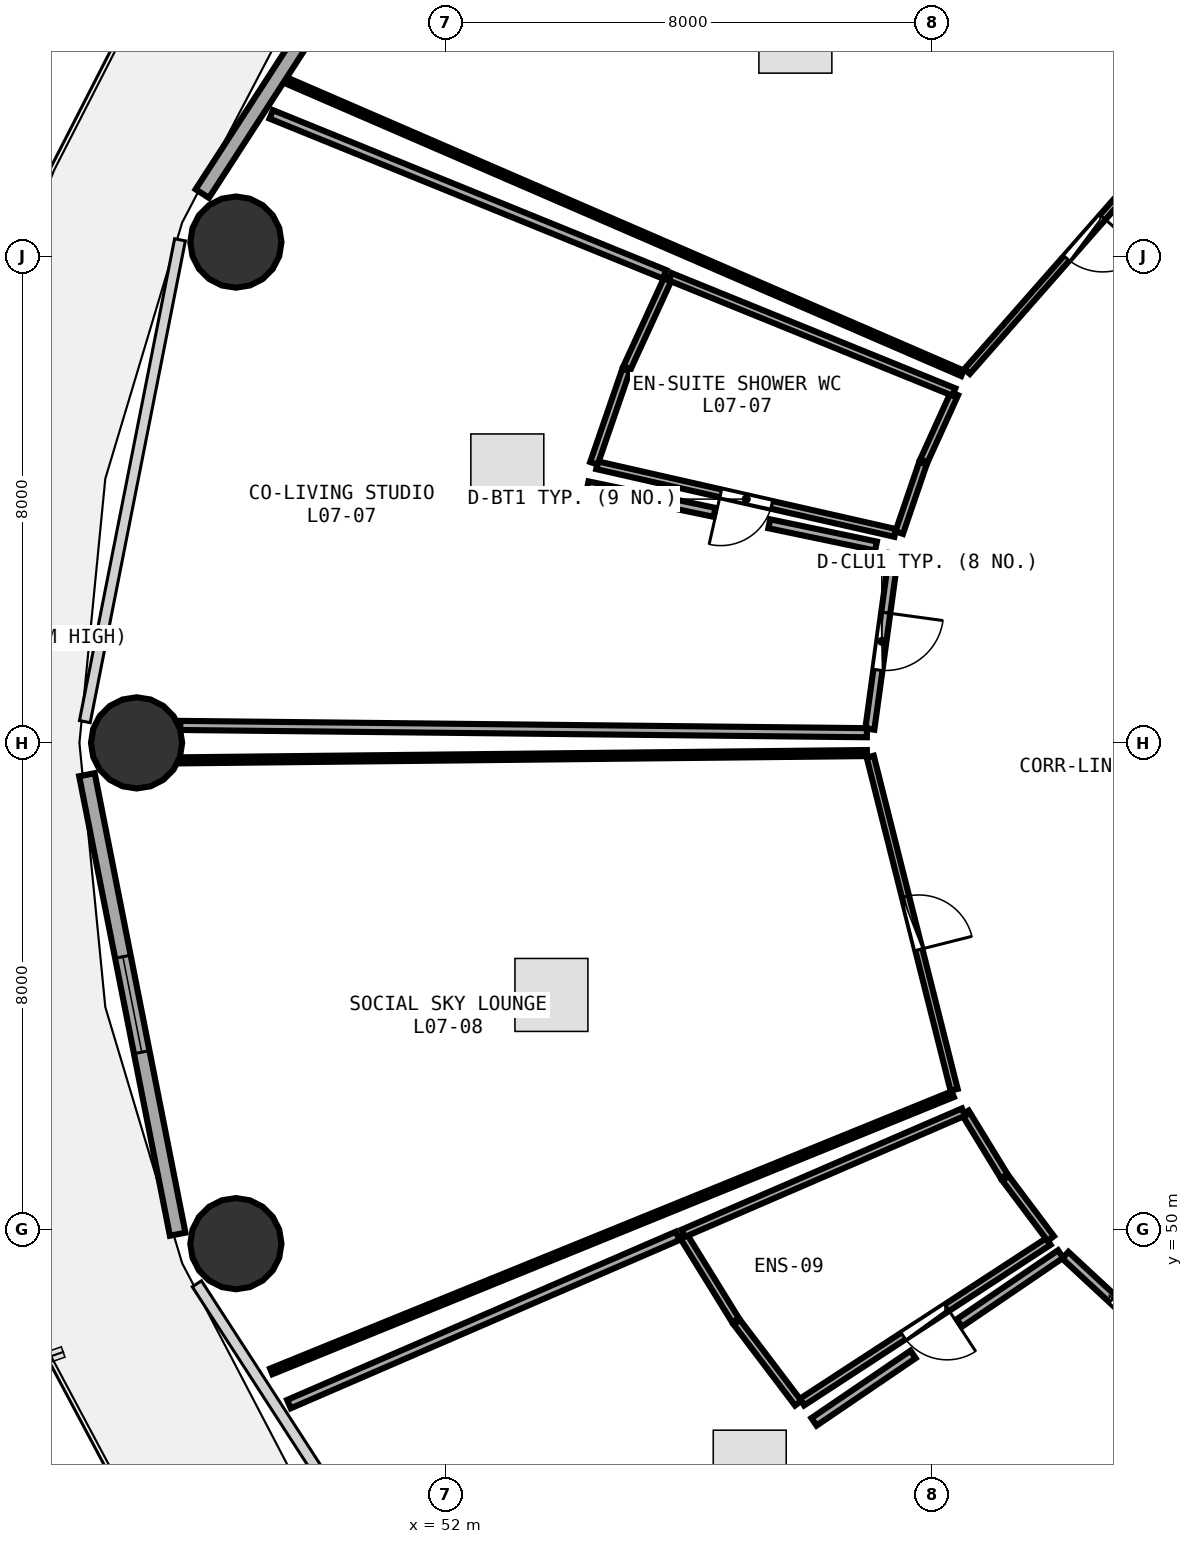
"""IFC4 building model, lengths in metres.
Left out: names, types, materials, properties, quantities, classifications, styles, units other than length and angle.
Written with IfcOpenShell. Run it as: python <this file> out.ifc"""

import sys

from ifc_helpers import new_model, si_unit, direction, frame, frame_2d, origin, origin_2d, place, context, subcontext, project, spatial, rectangle, circle, extrude, element, fill, save


model = new_model("IFC4")
c1 = context("Model", 3, precision=1e-05, world=origin(), true_north=direction((0.0, 1.0)))
c2 = subcontext(c1, "Body", "Model", "MODEL_VIEW")
j1 = project(units=[si_unit("LENGTHUNIT", "METRE"), si_unit("PLANEANGLEUNIT", "RADIAN")], contexts=[c1])
p1 = place(None, origin())
s1 = spatial("IfcSite", under=j1, at=p1, CompositionType="ELEMENT")
p2 = place(p1, origin())
s2 = spatial("IfcBuilding", under=s1, at=p2, CompositionType="ELEMENT")
p3 = place(p2, frame((0.0, 0.0, 30.0)))
s3 = spatial("IfcBuildingStorey", under=s2, at=p3, CompositionType="ELEMENT", Elevation=30.0)
for number, where, z_axis, x_axis in (
    (1, (48.553, 66.236, 0.0), (0.0, 0.0, 1.0), (1.0, 0.0, 0.0)),
    (2, (46.92, 58.0, 0.0), (0.0, 0.0, 1.0), (1.0, 0.0, 0.0)),
    (3, (48.553, 49.764, 0.0), (0.0, 0.0, 1.0), (1.0, 0.0, 0.0)),
):
    element("IfcColumn", number, at=place(p3, frame(where, z_axis=z_axis, x_axis=x_axis)), inside=s3, PredefinedType="COLUMN", context=c2, shape_type="SweptSolid", body=[
        extrude(circle(Radius=0.75, at=origin_2d()), origin(), (0.0, 0.0, 1.0), 3.75),
    ])
p4 = place(p3, frame((52.311, 73.698, 0.0), z_axis=(0.0, 0.0, 1.0), x_axis=(-0.543005114258, -0.839729388488, 0.0)))
e4 = element("IfcWall", 4, at=p4, inside=s3, PredefinedType="SOLIDWALL", context=c2, shape_type="SweptSolid", body=[
    extrude(rectangle(XDim=7.938, YDim=0.26, at=frame_2d((3.969, 0.0))), origin(), (0.0, 0.0, 1.0), 3.475),
])
p5 = place(p4, frame((3.494, 0.0, 0.0)))
e5 = element("IfcOpeningElement", 5, at=p5, cuts=e4, PredefinedType="OPENING", context=c2, shape_type="SweptSolid", body=[
    extrude(rectangle(XDim=0.95, YDim=2.1, at=frame_2d((0.475, 1.05))), frame((0.0, 0.14, 0.0), z_axis=(0.0, -1.0, 0.0), x_axis=(1.0, 0.0, 0.0)), (0.0, 0.0, 1.0), 0.28),
])
p6 = place(p4, frame((1.914, 0.0, 0.85)))
e6 = element("IfcOpeningElement", 6, at=p6, cuts=e4, PredefinedType="OPENING", context=c2, shape_type="SweptSolid", body=[
    extrude(rectangle(XDim=1.2, YDim=1.45, at=frame_2d((0.6, 0.725))), frame((0.0, 0.14, 0.0), z_axis=(0.0, -1.0, 0.0), x_axis=(1.0, 0.0, 0.0)), (0.0, 0.0, 1.0), 0.28),
])
p7 = place(p3, frame((46.104, 57.477, 0.0), z_axis=(0.0, 0.0, 1.0), x_axis=(0.193726159581, -0.98105564322, 0.0)))
e7 = element("IfcWall", 7, at=p7, inside=s3, PredefinedType="SOLIDWALL", context=c2, shape_type="SweptSolid", body=[
    extrude(rectangle(XDim=7.703, YDim=0.26, at=frame_2d((3.851, 0.0))), origin(), (0.0, 0.0, 1.0), 3.475),
])
p8 = place(p7, frame((3.051, 0.0, 0.85)))
e8 = element("IfcOpeningElement", 8, at=p8, cuts=e7, PredefinedType="OPENING", context=c2, shape_type="SweptSolid", body=[
    extrude(rectangle(XDim=1.6, YDim=1.45, at=frame_2d((0.8, 0.725))), frame((0.0, 0.14, 0.0), z_axis=(0.0, -1.0, 0.0), x_axis=(1.0, 0.0, 0.0)), (0.0, 0.0, 1.0), 0.28),
])
p9 = place(p3, frame((64.446, 68.507, 0.0), z_axis=(0.0, 0.0, 1.0), x_axis=(-0.660323401664, -0.75098136143, 0.0)))
e9 = element("IfcWall", 9, at=p9, inside=s3, PredefinedType="PARTITIONING", context=c2, shape_type="SweptSolid", body=[
    extrude(rectangle(XDim=5.857, YDim=0.12, at=frame_2d((2.929, 0.0))), origin(), (0.0, 0.0, 1.0), 2.875),
])
p10 = place(p9, frame((2.479, 0.0, 0.0)))
e10 = element("IfcOpeningElement", 10, at=p10, cuts=e9, PredefinedType="OPENING", context=c2, shape_type="SweptSolid", body=[
    extrude(rectangle(XDim=0.9, YDim=2.08, at=frame_2d((0.45, 1.04))), frame((0.0, 0.07, 0.0), z_axis=(0.0, -1.0, 0.0), x_axis=(1.0, 0.0, 0.0)), (0.0, 0.0, 1.0), 0.14),
])
p11 = place(p3, frame((59.397, 61.452, 0.0), z_axis=(0.0, 0.0, 1.0), x_axis=(-0.975187669184, 0.221379786503, 0.0)))
e11 = element("IfcWall", 11, at=p11, inside=s3, PredefinedType="PLUMBINGWALL", context=c2, shape_type="SweptSolid", body=[
    extrude(rectangle(XDim=5.029, YDim=0.13, at=frame_2d((2.514, 0.0))), origin(), (0.0, 0.0, 1.0), 3.175),
])
p12 = place(p11, frame((2.084, 0.0, 0.0)))
e12 = element("IfcOpeningElement", 12, at=p12, cuts=e11, PredefinedType="OPENING", context=c2, shape_type="SweptSolid", body=[
    extrude(rectangle(XDim=0.86, YDim=2.05, at=frame_2d((0.43, 1.025))), frame((0.0, 0.075, 0.0), z_axis=(0.0, -1.0, 0.0), x_axis=(1.0, 0.0, 0.0)), (0.0, 0.0, 1.0), 0.15),
])
p13 = place(p3, frame((59.375, 61.115, 0.0), z_axis=(0.0, 0.0, 1.0), x_axis=(-0.135838186105, -0.990731036758, 0.0)))
e13 = element("IfcWall", 13, at=p13, inside=s3, PredefinedType="PARTITIONING", context=c2, shape_type="SweptSolid", body=[
    extrude(rectangle(XDim=2.915, YDim=0.15, at=frame_2d((1.458, 0.0))), origin(), (0.0, 0.0, 1.0), 3.48),
])
p14 = place(p13, frame((0.983, 0.0, 0.0)))
e14 = element("IfcOpeningElement", 14, at=p14, cuts=e13, PredefinedType="OPENING", context=c2, shape_type="SweptSolid", body=[
    extrude(rectangle(XDim=0.95, YDim=2.08, at=frame_2d((0.475, 1.04))), frame((0.0, 0.085, 0.0), z_axis=(0.0, -1.0, 0.0), x_axis=(1.0, 0.0, 0.0)), (0.0, 0.0, 1.0), 0.17),
])
p15 = place(p3, frame((58.986, 57.775, 0.0), z_axis=(0.0, 0.0, 1.0), x_axis=(0.244192294026, -0.969726829338, 0.0)))
e15 = element("IfcWall", 15, at=p15, inside=s3, PredefinedType="PARTITIONING", context=c2, shape_type="SweptSolid", body=[
    extrude(rectangle(XDim=5.651, YDim=0.12, at=frame_2d((2.825, 0.0))), origin(), (0.0, 0.0, 1.0), 3.48),
])
p16 = place(p15, frame((2.375, 0.0, 0.0)))
e16 = element("IfcOpeningElement", 16, at=p16, cuts=e15, PredefinedType="OPENING", context=c2, shape_type="SweptSolid", body=[
    extrude(rectangle(XDim=0.9, YDim=2.08, at=frame_2d((0.45, 1.04))), frame((0.0, 0.07, 0.0), z_axis=(0.0, -1.0, 0.0), x_axis=(1.0, 0.0, 0.0)), (0.0, 0.0, 1.0), 0.14),
])
p17 = place(p3, frame((61.917, 49.8, 0.0), z_axis=(0.0, 0.0, 1.0), x_axis=(-0.837796261941, -0.545982988267, 0.0)))
e17 = element("IfcWall", 17, at=p17, inside=s3, PredefinedType="PLUMBINGWALL", context=c2, shape_type="SweptSolid", body=[
    extrude(rectangle(XDim=4.838, YDim=0.13, at=frame_2d((2.419, 0.0))), origin(), (0.0, 0.0, 1.0), 3.235),
])
p18 = place(p17, frame((1.989, 0.0, 0.0)))
e18 = element("IfcOpeningElement", 18, at=p18, cuts=e17, PredefinedType="OPENING", context=c2, shape_type="SweptSolid", body=[
    extrude(rectangle(XDim=0.86, YDim=2.05, at=frame_2d((0.43, 1.025))), frame((0.0, 0.075, 0.0), z_axis=(0.0, -1.0, 0.0), x_axis=(1.0, 0.0, 0.0)), (0.0, 0.0, 1.0), 0.15),
])
p19 = place(p3, frame((62.194, 49.575, 0.0), z_axis=(0.0, 0.0, 1.0), x_axis=(0.7329267348, -0.680307578538, 0.0)))
e19 = element("IfcWall", 19, at=p19, inside=s3, PredefinedType="PARTITIONING", context=c2, shape_type="SweptSolid", body=[
    extrude(rectangle(XDim=3.067, YDim=0.15, at=frame_2d((1.533, 0.0))), origin(), (0.0, 0.0, 1.0), 2.875),
])
p20 = place(p19, frame((1.059, 0.0, 0.0)))
e20 = element("IfcOpeningElement", 20, at=p20, cuts=e19, PredefinedType="OPENING", context=c2, shape_type="SweptSolid", body=[
    extrude(rectangle(XDim=0.95, YDim=2.08, at=frame_2d((0.475, 1.04))), frame((0.0, 0.085, 0.0), z_axis=(0.0, -1.0, 0.0), x_axis=(1.0, 0.0, 0.0)), (0.0, 0.0, 1.0), 0.17),
])
p21 = place(p3, frame((64.746, 68.789, 0.0), z_axis=(0.0, 0.0, 1.0), x_axis=(-0.66580890104, 0.746122313897, 0.0)))
e21 = element("IfcWall", 21, at=p21, inside=s3, PredefinedType="PARTITIONING", context=c2, shape_type="SweptSolid", body=[
    extrude(rectangle(XDim=11.399, YDim=0.15, at=frame_2d((5.7, 0.0))), origin(), (0.0, 0.0, 1.0), 2.875),
])
p22 = place(p3, frame((60.502, 64.079, 0.0), z_axis=(0.0, 0.0, 1.0), x_axis=(-0.917695041134, 0.397285554077, 0.0)))
e22 = element("IfcWall", 22, at=p22, inside=s3, PredefinedType="PARTITIONING", context=c2, shape_type="SweptSolid", body=[
    extrude(rectangle(XDim=12.07, YDim=0.1, at=frame_2d((6.035, 0.0))), origin(), (0.0, 0.0, 1.0), 2.875),
])
p23 = place(p3, frame((56.632, 76.922, 0.0), z_axis=(0.0, 0.0, 1.0), x_axis=(0.684261294523, -0.729236916796, 0.0)))
e23 = element("IfcWall", 23, at=p23, inside=s3, PredefinedType="PARTITIONING", context=c2, shape_type="SweptSolid", body=[
    extrude(rectangle(XDim=11.438, YDim=0.1, at=frame_2d((5.719, 0.0))), origin(), (0.0, 0.0, 1.0), 2.875),
])
p24 = place(p3, frame((60.372, 63.745, 0.0), z_axis=(0.0, 0.0, 1.0), x_axis=(-0.4138937247, -0.910325208183, 0.0)))
e24 = element("IfcWall", 24, at=p24, inside=s3, PredefinedType="PLUMBINGWALL", context=c2, shape_type="SweptSolid", body=[
    extrude(rectangle(XDim=1.216, YDim=0.13, at=frame_2d((0.608, 0.0))), origin(), (0.0, 0.0, 1.0), 3.48),
])
p25 = place(p3, frame((59.854, 62.601, 0.0), z_axis=(0.0, 0.0, 1.0), x_axis=(-0.323735286305, -0.946147696928, 0.0)))
e25 = element("IfcWall", 25, at=p25, inside=s3, PredefinedType="PLUMBINGWALL", context=c2, shape_type="SweptSolid", body=[
    extrude(rectangle(XDim=1.208, YDim=0.13, at=frame_2d((0.604, 0.0))), origin(), (0.0, 0.0, 1.0), 3.48),
])
p26 = place(p3, frame((54.441, 62.598, 0.0), z_axis=(0.0, 0.0, 1.0), x_axis=(0.326356647952, 0.945246707657, 0.0)))
e26 = element("IfcWall", 26, at=p26, inside=s3, PredefinedType="PLUMBINGWALL", context=c2, shape_type="SweptSolid", body=[
    extrude(rectangle(XDim=1.624, YDim=0.13, at=frame_2d((0.812, 0.0))), origin(), (0.0, 0.0, 1.0), 3.48),
])
p27 = place(p3, frame((54.986, 64.17, 0.0), z_axis=(0.0, 0.0, 1.0), x_axis=(0.41762687648, 0.908618617486, 0.0)))
e27 = element("IfcWall", 27, at=p27, inside=s3, PredefinedType="PLUMBINGWALL", context=c2, shape_type="SweptSolid", body=[
    extrude(rectangle(XDim=1.634, YDim=0.13, at=frame_2d((0.817, 0.0))), origin(), (0.0, 0.0, 1.0), 2.875),
])
p28 = place(p3, frame((55.696, 65.666, 0.0), z_axis=(0.0, 0.0, 1.0), x_axis=(0.926504606816, -0.376283421835, 0.0)))
e28 = element("IfcWall", 28, at=p28, inside=s3, PredefinedType="PLUMBINGWALL", context=c2, shape_type="SweptSolid", body=[
    extrude(rectangle(XDim=5.036, YDim=0.13, at=frame_2d((2.518, 0.0))), origin(), (0.0, 0.0, 1.0), 2.875),
])
p29 = place(p3, frame((58.931, 58.167, 0.0), z_axis=(0.0, 0.0, 1.0), x_axis=(-0.999943877154, 0.010594458135, 0.0)))
e29 = element("IfcWall", 29, at=p29, inside=s3, PredefinedType="PARTITIONING", context=c2, shape_type="SweptSolid", body=[
    extrude(rectangle(XDim=11.292, YDim=0.15, at=frame_2d((5.646, 0.0))), origin(), (0.0, 0.0, 1.0), 2.875),
])
p30 = place(p3, frame((49.135, 68.336, 0.0), z_axis=(0.0, 0.0, 1.0), x_axis=(0.926325178802, -0.376724917038, 0.0)))
e30 = element("IfcWall", 30, at=p30, inside=s3, PredefinedType="PARTITIONING", context=c2, shape_type="SweptSolid", body=[
    extrude(rectangle(XDim=6.983, YDim=0.15, at=frame_2d((3.492, 0.0))), origin(), (0.0, 0.0, 1.0), 2.875),
])
p31 = place(p3, frame((54.337, 62.227, 0.0), z_axis=(0.0, 0.0, 1.0), x_axis=(0.978922282622, -0.204233113343, 0.0)))
e31 = element("IfcWall", 31, at=p31, inside=s3, PredefinedType="PARTITIONING", context=c2, shape_type="SweptSolid", body=[
    extrude(rectangle(XDim=2.133, YDim=0.15, at=frame_2d((1.066, 0.0))), origin(), (0.0, 0.0, 1.0), 3.175),
])
p32 = place(p3, frame((57.325, 61.603, 0.0), z_axis=(0.0, 0.0, 1.0), x_axis=(0.978929424395, -0.204198878681, 0.0)))
e32 = element("IfcWall", 32, at=p32, inside=s3, PredefinedType="PARTITIONING", context=c2, shape_type="SweptSolid", body=[
    extrude(rectangle(XDim=1.793, YDim=0.15, at=frame_2d((0.897, 0.0))), origin(), (0.0, 0.0, 1.0), 3.235),
])
p33 = place(p3, frame((60.343, 52.222, 0.0), z_axis=(0.0, 0.0, 1.0), x_axis=(-0.926333713065, -0.376703931542, 0.0)))
e33 = element("IfcWall", 33, at=p33, inside=s3, PredefinedType="PARTITIONING", context=c2, shape_type="SweptSolid", body=[
    extrude(rectangle(XDim=12.099, YDim=0.1, at=frame_2d((6.05, 0.0))), origin(), (0.0, 0.0, 1.0), 2.875),
])
p34 = place(p3, frame((47.64, 57.713, 0.0), z_axis=(0.0, 0.0, 1.0), x_axis=(0.999943877154, 0.010594458135, 0.0)))
e34 = element("IfcWall", 34, at=p34, inside=s3, PredefinedType="PARTITIONING", context=c2, shape_type="SweptSolid", body=[
    extrude(rectangle(XDim=11.292, YDim=0.1, at=frame_2d((5.646, 0.0))), origin(), (0.0, 0.0, 1.0), 2.875),
])
p35 = place(p3, frame((60.549, 51.92, 0.0), z_axis=(0.0, 0.0, 1.0), x_axis=(0.52146609248, -0.853272004928, 0.0)))
e35 = element("IfcWall", 35, at=p35, inside=s3, PredefinedType="PLUMBINGWALL", context=c2, shape_type="SweptSolid", body=[
    extrude(rectangle(XDim=1.228, YDim=0.13, at=frame_2d((0.614, 0.0))), origin(), (0.0, 0.0, 1.0), 3.48),
])
p36 = place(p3, frame((61.212, 50.839, 0.0), z_axis=(0.0, 0.0, 1.0), x_axis=(0.600347056143, -0.79973959023, 0.0)))
e36 = element("IfcWall", 36, at=p36, inside=s3, PredefinedType="PLUMBINGWALL", context=c2, shape_type="SweptSolid", body=[
    extrude(rectangle(XDim=1.238, YDim=0.13, at=frame_2d((0.619, 0.0))), origin(), (0.0, 0.0, 1.0), 2.875),
])
p37 = place(p3, frame((57.801, 47.142, 0.0), z_axis=(0.0, 0.0, 1.0), x_axis=(-0.60376191721, 0.797164692725, 0.0)))
e37 = element("IfcWall", 37, at=p37, inside=s3, PredefinedType="PLUMBINGWALL", context=c2, shape_type="SweptSolid", body=[
    extrude(rectangle(XDim=1.669, YDim=0.13, at=frame_2d((0.834, 0.0))), origin(), (0.0, 0.0, 1.0), 3.175),
])
p38 = place(p3, frame((56.771, 48.505, 0.0), z_axis=(0.0, 0.0, 1.0), x_axis=(-0.525540089642, 0.850768837099, 0.0)))
e38 = element("IfcWall", 38, at=p38, inside=s3, PredefinedType="PLUMBINGWALL", context=c2, shape_type="SweptSolid", body=[
    extrude(rectangle(XDim=1.651, YDim=0.13, at=frame_2d((0.826, 0.0))), origin(), (0.0, 0.0, 1.0), 3.175),
])
p39 = place(p3, frame((55.91, 49.935, 0.0), z_axis=(0.0, 0.0, 1.0), x_axis=(0.917797204715, 0.397049481826, 0.0)))
e39 = element("IfcWall", 39, at=p39, inside=s3, PredefinedType="PLUMBINGWALL", context=c2, shape_type="SweptSolid", body=[
    extrude(rectangle(XDim=5.023, YDim=0.13, at=frame_2d((2.511, 0.0))), origin(), (0.0, 0.0, 1.0), 2.875),
])
p40 = place(p3, frame((64.458, 47.419, 0.0), z_axis=(0.0, 0.0, 1.0), x_axis=(-0.684261294523, -0.729236916796, 0.0)))
e40 = element("IfcWall", 40, at=p40, inside=s3, PredefinedType="PARTITIONING", context=c2, shape_type="SweptSolid", body=[
    extrude(rectangle(XDim=11.438, YDim=0.15, at=frame_2d((5.719, 0.0))), origin(), (0.0, 0.0, 1.0), 2.875),
])
p41 = place(p3, frame((49.426, 47.126, 0.0), z_axis=(0.0, 0.0, 1.0), x_axis=(0.917736225937, 0.397190407239, 0.0)))
e41 = element("IfcWall", 41, at=p41, inside=s3, PredefinedType="PARTITIONING", context=c2, shape_type="SweptSolid", body=[
    extrude(rectangle(XDim=6.967, YDim=0.15, at=frame_2d((3.483, 0.0))), origin(), (0.0, 0.0, 1.0), 2.875),
])
p42 = place(p3, frame((58.061, 46.834, 0.0), z_axis=(0.0, 0.0, 1.0), x_axis=(0.826811291248, 0.562479411769, 0.0)))
e42 = element("IfcWall", 42, at=p42, inside=s3, PredefinedType="PARTITIONING", context=c2, shape_type="SweptSolid", body=[
    extrude(rectangle(XDim=1.971, YDim=0.15, at=frame_2d((0.985, 0.0))), origin(), (0.0, 0.0, 1.0), 3.48),
])
p43 = place(p3, frame((60.451, 48.461, 0.0), z_axis=(0.0, 0.0, 1.0), x_axis=(0.826867883695, 0.562396215237, 0.0)))
e43 = element("IfcWall", 43, at=p43, inside=s3, PredefinedType="PARTITIONING", context=c2, shape_type="SweptSolid", body=[
    extrude(rectangle(XDim=2.014, YDim=0.15, at=frame_2d((1.007, 0.0))), origin(), (0.0, 0.0, 1.0), 3.235),
])
p44 = place(p3, frame((57.156, 38.706, 0.0), z_axis=(0.0, 0.0, 1.0), x_axis=(0.66580890104, 0.746122313897, 0.0)))
e44 = element("IfcWall", 44, at=p44, inside=s3, PredefinedType="PARTITIONING", context=c2, shape_type="SweptSolid", body=[
    extrude(rectangle(XDim=11.399, YDim=0.1, at=frame_2d((5.7, 0.0))), origin(), (0.0, 0.0, 1.0), 2.875),
])
p45 = place(p8, origin())
e45 = element("IfcWindow", 45, at=p45, inside=s3, PartitioningType="SINGLE_PANEL", PredefinedType="WINDOW", context=c2, shape_type="SweptSolid", body=[
    extrude(rectangle(XDim=1.6, YDim=1.45, at=frame_2d((0.8, 0.725))), frame((0.0, 0.03, 0.0), z_axis=(0.0, -1.0, 0.0), x_axis=(1.0, 0.0, 0.0)), (0.0, 0.0, 1.0), 0.06),
])
fill(e8, e45)
p46 = place(p10, origin())
e46 = element("IfcDoor", 46, at=p46, inside=s3, OperationType="SINGLE_SWING_LEFT", PredefinedType="DOOR", context=c2, shape_type="SweptSolid", body=[
    extrude(rectangle(XDim=0.9, YDim=2.08, at=frame_2d((0.45, 1.04))), frame((0.0, 0.025, 0.0), z_axis=(0.0, -1.0, 0.0), x_axis=(1.0, 0.0, 0.0)), (0.0, 0.0, 1.0), 0.05),
])
fill(e10, e46)
p47 = place(p12, origin())
e47 = element("IfcDoor", 47, at=p47, inside=s3, OperationType="SINGLE_SWING_RIGHT", PredefinedType="DOOR", context=c2, shape_type="SweptSolid", body=[
    extrude(rectangle(XDim=0.86, YDim=2.05, at=frame_2d((0.43, 1.025))), frame((0.0, 0.025, 0.0), z_axis=(0.0, -1.0, 0.0), x_axis=(1.0, 0.0, 0.0)), (0.0, 0.0, 1.0), 0.05),
])
fill(e12, e47)
p48 = place(p14, origin())
e48 = element("IfcDoor", 48, at=p48, inside=s3, OperationType="SINGLE_SWING_LEFT", PredefinedType="DOOR", context=c2, shape_type="SweptSolid", body=[
    extrude(rectangle(XDim=0.95, YDim=2.08, at=frame_2d((0.475, 1.04))), frame((0.0, 0.025, 0.0), z_axis=(0.0, -1.0, 0.0), x_axis=(1.0, 0.0, 0.0)), (0.0, 0.0, 1.0), 0.05),
])
fill(e14, e48)
p49 = place(p16, origin())
e49 = element("IfcDoor", 49, at=p49, inside=s3, OperationType="SINGLE_SWING_RIGHT", PredefinedType="DOOR", context=c2, shape_type="SweptSolid", body=[
    extrude(rectangle(XDim=0.9, YDim=2.08, at=frame_2d((0.45, 1.04))), frame((0.0, 0.025, 0.0), z_axis=(0.0, -1.0, 0.0), x_axis=(1.0, 0.0, 0.0)), (0.0, 0.0, 1.0), 0.05),
])
fill(e16, e49)
p50 = place(p18, origin())
e50 = element("IfcDoor", 50, at=p50, inside=s3, OperationType="SINGLE_SWING_LEFT", PredefinedType="DOOR", context=c2, shape_type="SweptSolid", body=[
    extrude(rectangle(XDim=0.86, YDim=2.05, at=frame_2d((0.43, 1.025))), frame((0.0, 0.025, 0.0), z_axis=(0.0, -1.0, 0.0), x_axis=(1.0, 0.0, 0.0)), (0.0, 0.0, 1.0), 0.05),
])
fill(e18, e50)
p51 = place(p20, origin())
e51 = element("IfcDoor", 51, at=p51, inside=s3, OperationType="SINGLE_SWING_RIGHT", PredefinedType="DOOR", context=c2, shape_type="SweptSolid", body=[
    extrude(rectangle(XDim=0.95, YDim=2.08, at=frame_2d((0.475, 1.04))), frame((0.0, 0.025, 0.0), z_axis=(0.0, -1.0, 0.0), x_axis=(1.0, 0.0, 0.0)), (0.0, 0.0, 1.0), 0.05),
])
fill(e20, e51)
save(model, sys.argv[1])
